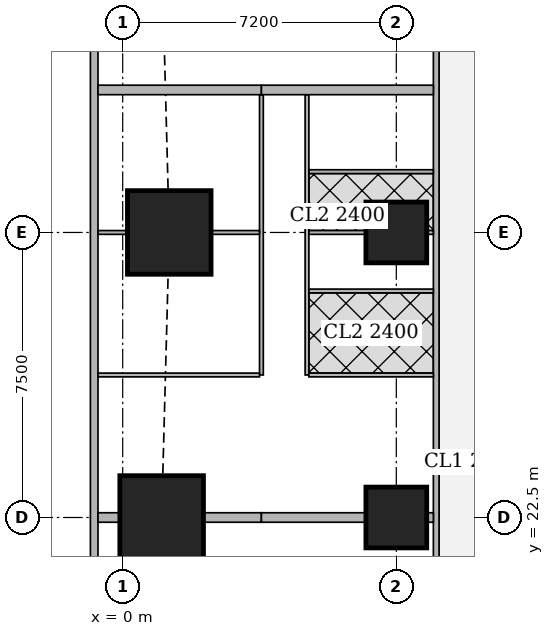
"""IFC4 building model, lengths in metres.
Left out: names, types, materials, properties, quantities, classifications, styles, units other than length and angle.
Written with IfcOpenShell. Run it as: python <this file> out.ifc"""

import sys

from ifc_helpers import new_model, si_unit, direction, frame, frame_2d, origin, origin_2d, place, context, subcontext, project, spatial, rectangle, extrude, element, fill, save


model = new_model("IFC4")
c1 = context("Model", 3, precision=1e-05, world=origin(), true_north=direction((0.0, 1.0)))
c2 = subcontext(c1, "Body", "Model", "MODEL_VIEW")
j1 = project(units=[si_unit("LENGTHUNIT", "METRE"), si_unit("PLANEANGLEUNIT", "RADIAN")], contexts=[c1])
p1 = place(None, origin())
s1 = spatial("IfcSite", under=j1, at=p1, CompositionType="ELEMENT")
p2 = place(p1, origin())
s2 = spatial("IfcBuilding", under=s1, at=p2, CompositionType="ELEMENT")
p3 = place(p2, frame((0.0, 0.0, 81.65)))
s3 = spatial("IfcBuildingStorey", under=s2, at=p3, CompositionType="ELEMENT", Elevation=81.65)
p4 = place(p3, frame((1.025, 22.5, 0.0), z_axis=(0.0, 0.0, 1.0), x_axis=(1.0, 0.0, 0.0)))
e1 = element("IfcColumn", 1, at=p4, inside=s3, PredefinedType="COLUMN", context=c2, shape_type="SweptSolid", body=[
    extrude(rectangle(XDim=2.2, YDim=2.2, at=origin_2d()), origin(), (0.0, 0.0, 1.0), 3.75),
])
p5 = place(p3, frame((7.2, 22.5, 0.0), z_axis=(0.0, 0.0, 1.0), x_axis=(1.0, 0.0, 0.0)))
e2 = element("IfcColumn", 2, at=p5, inside=s3, PredefinedType="COLUMN", context=c2, shape_type="SweptSolid", body=[
    extrude(rectangle(XDim=1.6, YDim=1.6, at=origin_2d()), origin(), (0.0, 0.0, 1.0), 3.75),
])
p6 = place(p3, frame((1.225, 30.0, 0.0), z_axis=(0.0, 0.0, 1.0), x_axis=(1.0, 0.0, 0.0)))
e3 = element("IfcColumn", 3, at=p6, inside=s3, PredefinedType="COLUMN", context=c2, shape_type="SweptSolid", body=[
    extrude(rectangle(XDim=2.2, YDim=2.2, at=origin_2d()), origin(), (0.0, 0.0, 1.0), 3.75),
])
p7 = place(p3, frame((7.2, 30.0, 0.0), z_axis=(0.0, 0.0, 1.0), x_axis=(1.0, 0.0, 0.0)))
e4 = element("IfcColumn", 4, at=p7, inside=s3, PredefinedType="COLUMN", context=c2, shape_type="SweptSolid", body=[
    extrude(rectangle(XDim=1.6, YDim=1.6, at=origin_2d()), origin(), (0.0, 0.0, 1.0), 3.75),
])
p8 = place(p3, frame((-0.75, 42.837, 0.0), z_axis=(0.0, 0.0, 1.0), x_axis=(0.0, -1.0, 0.0)))
e5 = element("IfcWall", 5, at=p8, inside=s3, PredefinedType="SOLIDWALL", context=c2, shape_type="SweptSolid", body=[
    extrude(rectangle(XDim=40.674, YDim=0.2, at=frame_2d((20.337, 0.0))), origin(), (0.0, 0.0, 1.0), 3.5),
])
p9 = place(p8, frame((1.78, 0.0, 0.9)))
e6 = element("IfcOpeningElement", 6, at=p9, cuts=e5, PredefinedType="OPENING", context=c2, shape_type="SweptSolid", body=[
    extrude(rectangle(XDim=1.8, YDim=1.5, at=frame_2d((0.9, 0.75))), frame((0.0, 0.11, 0.0), z_axis=(0.0, -1.0, 0.0), x_axis=(1.0, 0.0, 0.0)), (0.0, 0.0, 1.0), 0.22),
])
p10 = place(p8, frame((6.312, 0.0, 0.9)))
e7 = element("IfcOpeningElement", 7, at=p10, cuts=e5, PredefinedType="OPENING", context=c2, shape_type="SweptSolid", body=[
    extrude(rectangle(XDim=1.8, YDim=1.5, at=frame_2d((0.9, 0.75))), frame((0.0, 0.11, 0.0), z_axis=(0.0, -1.0, 0.0), x_axis=(1.0, 0.0, 0.0)), (0.0, 0.0, 1.0), 0.22),
])
p11 = place(p8, frame((10.062, 0.0, 0.9)))
e8 = element("IfcOpeningElement", 8, at=p11, cuts=e5, PredefinedType="OPENING", context=c2, shape_type="SweptSolid", body=[
    extrude(rectangle(XDim=1.8, YDim=1.5, at=frame_2d((0.9, 0.75))), frame((0.0, 0.11, 0.0), z_axis=(0.0, -1.0, 0.0), x_axis=(1.0, 0.0, 0.0)), (0.0, 0.0, 1.0), 0.22),
])
p12 = place(p8, frame((13.812, 0.0, 0.9)))
e9 = element("IfcOpeningElement", 9, at=p12, cuts=e5, PredefinedType="OPENING", context=c2, shape_type="SweptSolid", body=[
    extrude(rectangle(XDim=1.8, YDim=1.5, at=frame_2d((0.9, 0.75))), frame((0.0, 0.11, 0.0), z_axis=(0.0, -1.0, 0.0), x_axis=(1.0, 0.0, 0.0)), (0.0, 0.0, 1.0), 0.22),
])
p13 = place(p8, frame((17.562, 0.0, 0.9)))
e10 = element("IfcOpeningElement", 10, at=p13, cuts=e5, PredefinedType="OPENING", context=c2, shape_type="SweptSolid", body=[
    extrude(rectangle(XDim=1.8, YDim=1.5, at=frame_2d((0.9, 0.75))), frame((0.0, 0.11, 0.0), z_axis=(0.0, -1.0, 0.0), x_axis=(1.0, 0.0, 0.0)), (0.0, 0.0, 1.0), 0.22),
])
p14 = place(p8, frame((21.312, 0.0, 0.9)))
e11 = element("IfcOpeningElement", 11, at=p14, cuts=e5, PredefinedType="OPENING", context=c2, shape_type="SweptSolid", body=[
    extrude(rectangle(XDim=1.8, YDim=1.5, at=frame_2d((0.9, 0.75))), frame((0.0, 0.11, 0.0), z_axis=(0.0, -1.0, 0.0), x_axis=(1.0, 0.0, 0.0)), (0.0, 0.0, 1.0), 0.22),
])
p15 = place(p8, frame((25.062, 0.0, 0.9)))
e12 = element("IfcOpeningElement", 12, at=p15, cuts=e5, PredefinedType="OPENING", context=c2, shape_type="SweptSolid", body=[
    extrude(rectangle(XDim=1.8, YDim=1.5, at=frame_2d((0.9, 0.75))), frame((0.0, 0.11, 0.0), z_axis=(0.0, -1.0, 0.0), x_axis=(1.0, 0.0, 0.0)), (0.0, 0.0, 1.0), 0.22),
])
p16 = place(p8, frame((28.812, 0.0, 0.9)))
e13 = element("IfcOpeningElement", 13, at=p16, cuts=e5, PredefinedType="OPENING", context=c2, shape_type="SweptSolid", body=[
    extrude(rectangle(XDim=1.8, YDim=1.5, at=frame_2d((0.9, 0.75))), frame((0.0, 0.11, 0.0), z_axis=(0.0, -1.0, 0.0), x_axis=(1.0, 0.0, 0.0)), (0.0, 0.0, 1.0), 0.22),
])
p17 = place(p8, frame((32.562, 0.0, 0.9)))
e14 = element("IfcOpeningElement", 14, at=p17, cuts=e5, PredefinedType="OPENING", context=c2, shape_type="SweptSolid", body=[
    extrude(rectangle(XDim=1.8, YDim=1.5, at=frame_2d((0.9, 0.75))), frame((0.0, 0.11, 0.0), z_axis=(0.0, -1.0, 0.0), x_axis=(1.0, 0.0, 0.0)), (0.0, 0.0, 1.0), 0.22),
])
p18 = place(p8, frame((37.094, 0.0, 0.9)))
e15 = element("IfcOpeningElement", 15, at=p18, cuts=e5, PredefinedType="OPENING", context=c2, shape_type="SweptSolid", body=[
    extrude(rectangle(XDim=1.8, YDim=1.5, at=frame_2d((0.9, 0.75))), frame((0.0, 0.11, 0.0), z_axis=(0.0, -1.0, 0.0), x_axis=(1.0, 0.0, 0.0)), (0.0, 0.0, 1.0), 0.22),
])
p19 = place(p3, frame((8.25, 2.126, 0.0), z_axis=(0.0, 0.0, 1.0), x_axis=(0.0, 1.0, 0.0)))
e16 = element("IfcWall", 16, at=p19, inside=s3, PredefinedType="SOLIDWALL", context=c2, shape_type="SweptSolid", body=[
    extrude(rectangle(XDim=40.773, YDim=0.15, at=frame_2d((20.386, 0.0))), origin(), (0.0, 0.0, 1.0), 3.5),
])
p20 = place(p19, frame((17.787, 0.0, 0.0)))
e17 = element("IfcOpeningElement", 17, at=p20, cuts=e16, PredefinedType="OPENING", context=c2, shape_type="SweptSolid", body=[
    extrude(rectangle(XDim=1.0, YDim=2.1, at=frame_2d((0.5, 1.05))), frame((0.0, 0.085, 0.0), z_axis=(0.0, -1.0, 0.0), x_axis=(1.0, 0.0, 0.0)), (0.0, 0.0, 1.0), 0.17),
])
p21 = place(p19, frame((21.962, 0.0, 0.0)))
e18 = element("IfcOpeningElement", 18, at=p21, cuts=e16, PredefinedType="OPENING", context=c2, shape_type="SweptSolid", body=[
    extrude(rectangle(XDim=1.0, YDim=2.1, at=frame_2d((0.5, 1.05))), frame((0.0, 0.085, 0.0), z_axis=(0.0, -1.0, 0.0), x_axis=(1.0, 0.0, 0.0)), (0.0, 0.0, 1.0), 0.17),
])
p22 = place(p19, frame((32.787, 0.0, 0.0)))
e19 = element("IfcOpeningElement", 19, at=p22, cuts=e16, PredefinedType="OPENING", context=c2, shape_type="SweptSolid", body=[
    extrude(rectangle(XDim=1.0, YDim=2.1, at=frame_2d((0.5, 1.05))), frame((0.0, 0.085, 0.0), z_axis=(0.0, -1.0, 0.0), x_axis=(1.0, 0.0, 0.0)), (0.0, 0.0, 1.0), 0.17),
])
p23 = place(p3, frame((3.65, 26.25, 0.0), z_axis=(0.0, 0.0, 1.0), x_axis=(0.0, 1.0, 0.0)))
e20 = element("IfcWall", 20, at=p23, inside=s3, PredefinedType="PARTITIONING", context=c2, shape_type="SweptSolid", body=[
    extrude(rectangle(XDim=7.375, YDim=0.1, at=frame_2d((3.688, 0.0))), origin(), (0.0, 0.0, 1.0), 3.5),
])
p24 = place(p23, frame((0.2, 0.0, 0.0)))
e21 = element("IfcOpeningElement", 21, at=p24, cuts=e20, PredefinedType="OPENING", context=c2, shape_type="SweptSolid", body=[
    extrude(rectangle(XDim=0.9, YDim=2.1, at=frame_2d((0.45, 1.05))), frame((0.0, 0.06, 0.0), z_axis=(0.0, -1.0, 0.0), x_axis=(1.0, 0.0, 0.0)), (0.0, 0.0, 1.0), 0.12),
])
p25 = place(p23, frame((3.95, 0.0, 0.0)))
e22 = element("IfcOpeningElement", 22, at=p25, cuts=e20, PredefinedType="OPENING", context=c2, shape_type="SweptSolid", body=[
    extrude(rectangle(XDim=0.9, YDim=2.1, at=frame_2d((0.45, 1.05))), frame((0.0, 0.06, 0.0), z_axis=(0.0, -1.0, 0.0), x_axis=(1.0, 0.0, 0.0)), (0.0, 0.0, 1.0), 0.12),
])
p26 = place(p3, frame((4.85, 26.25, 0.0), z_axis=(0.0, 0.0, 1.0), x_axis=(0.0, 1.0, 0.0)))
e23 = element("IfcWall", 23, at=p26, inside=s3, PredefinedType="PARTITIONING", context=c2, shape_type="SweptSolid", body=[
    extrude(rectangle(XDim=7.375, YDim=0.1, at=frame_2d((3.688, 0.0))), origin(), (0.0, 0.0, 1.0), 3.5),
])
p27 = place(p26, frame((0.655, 0.0, 0.0)))
e24 = element("IfcOpeningElement", 24, at=p27, cuts=e23, PredefinedType="OPENING", context=c2, shape_type="SweptSolid", body=[
    extrude(rectangle(XDim=0.9, YDim=2.1, at=frame_2d((0.45, 1.05))), frame((0.0, 0.06, 0.0), z_axis=(0.0, -1.0, 0.0), x_axis=(1.0, 0.0, 0.0)), (0.0, 0.0, 1.0), 0.12),
])
p28 = place(p26, frame((4.1, 0.0, 0.0)))
e25 = element("IfcOpeningElement", 25, at=p28, cuts=e23, PredefinedType="OPENING", context=c2, shape_type="SweptSolid", body=[
    extrude(rectangle(XDim=0.9, YDim=2.1, at=frame_2d((0.45, 1.05))), frame((0.0, 0.06, 0.0), z_axis=(0.0, -1.0, 0.0), x_axis=(1.0, 0.0, 0.0)), (0.0, 0.0, 1.0), 0.12),
])
p29 = place(p26, frame((2.53, 0.0, 0.0)))
e26 = element("IfcOpeningElement", 26, at=p29, cuts=e23, PredefinedType="OPENING", context=c2, shape_type="SweptSolid", body=[
    extrude(rectangle(XDim=0.9, YDim=2.1, at=frame_2d((0.45, 1.05))), frame((0.0, 0.06, 0.0), z_axis=(0.0, -1.0, 0.0), x_axis=(1.0, 0.0, 0.0)), (0.0, 0.0, 1.0), 0.12),
])
p30 = place(p26, frame((5.975, 0.0, 0.0)))
e27 = element("IfcOpeningElement", 27, at=p30, cuts=e23, PredefinedType="OPENING", context=c2, shape_type="SweptSolid", body=[
    extrude(rectangle(XDim=0.9, YDim=2.1, at=frame_2d((0.45, 1.05))), frame((0.0, 0.06, 0.0), z_axis=(0.0, -1.0, 0.0), x_axis=(1.0, 0.0, 0.0)), (0.0, 0.0, 1.0), 0.12),
])
p31 = place(p3, frame((-0.65, 26.25, 0.0), z_axis=(0.0, 0.0, 1.0), x_axis=(1.0, 0.0, 0.0)))
e28 = element("IfcWall", 28, at=p31, inside=s3, PredefinedType="PARTITIONING", context=c2, shape_type="SweptSolid", body=[
    extrude(rectangle(XDim=4.25, YDim=0.1, at=frame_2d((2.125, 0.0))), origin(), (0.0, 0.0, 1.0), 2.2),
])
p32 = place(p3, frame((-0.65, 30.0, 0.0), z_axis=(0.0, 0.0, 1.0), x_axis=(1.0, 0.0, 0.0)))
e29 = element("IfcWall", 29, at=p32, inside=s3, PredefinedType="PARTITIONING", context=c2, shape_type="SweptSolid", body=[
    extrude(rectangle(XDim=0.774, YDim=0.1, at=frame_2d((0.387, 0.0))), origin(), (0.0, 0.0, 1.0), 3.5),
])
p33 = place(p3, frame((2.326, 30.0, 0.0), z_axis=(0.0, 0.0, 1.0), x_axis=(1.0, 0.0, 0.0)))
e30 = element("IfcWall", 30, at=p33, inside=s3, PredefinedType="PARTITIONING", context=c2, shape_type="SweptSolid", body=[
    extrude(rectangle(XDim=1.274, YDim=0.1, at=frame_2d((0.637, 0.0))), origin(), (0.0, 0.0, 1.0), 3.5),
])
p34 = place(p3, frame((4.9, 26.25, 0.0), z_axis=(0.0, 0.0, 1.0), x_axis=(1.0, 0.0, 0.0)))
e31 = element("IfcWall", 31, at=p34, inside=s3, PredefinedType="PARTITIONING", context=c2, shape_type="SweptSolid", body=[
    extrude(rectangle(XDim=3.275, YDim=0.1, at=frame_2d((1.638, 0.0))), origin(), (0.0, 0.0, 1.0), 3.5),
])
p35 = place(p3, frame((4.9, 30.0, 0.0), z_axis=(0.0, 0.0, 1.0), x_axis=(1.0, 0.0, 0.0)))
e32 = element("IfcWall", 32, at=p35, inside=s3, PredefinedType="PARTITIONING", context=c2, shape_type="SweptSolid", body=[
    extrude(rectangle(XDim=1.499, YDim=0.1, at=frame_2d((0.75, 0.0))), origin(), (0.0, 0.0, 1.0), 3.5),
])
p36 = place(p3, frame((8.001, 30.0, 0.0), z_axis=(0.0, 0.0, 1.0), x_axis=(1.0, 0.0, 0.0)))
e33 = element("IfcWall", 33, at=p36, inside=s3, PredefinedType="PARTITIONING", context=c2, shape_type="SweptSolid", body=[
    extrude(rectangle(XDim=0.174, YDim=0.1, at=frame_2d((0.087, 0.0))), origin(), (0.0, 0.0, 1.0), 3.5),
])
for number, where, z_axis, x_axis in (
    (34, (4.9, 28.46, 0.0), (0.0, 0.0, 1.0), (1.0, 0.0, 0.0)),
    (35, (4.9, 31.6, 0.0), (0.0, 0.0, 1.0), (1.0, 0.0, 0.0)),
):
    element("IfcWall", number, at=place(p3, frame(where, z_axis=z_axis, x_axis=x_axis)), inside=s3, PredefinedType="PARTITIONING", context=c2, shape_type="SweptSolid", body=[
        extrude(rectangle(XDim=3.275, YDim=0.1, at=frame_2d((1.638, 0.0))), origin(), (0.0, 0.0, 1.0), 3.5),
    ])
p37 = place(p3, frame((-0.65, 22.5, 0.0), z_axis=(0.0, 0.0, 1.0), x_axis=(1.0, 0.0, 0.0)))
e36 = element("IfcWall", 36, at=p37, inside=s3, PredefinedType="SOLIDWALL", context=c2, shape_type="SweptSolid", body=[
    extrude(rectangle(XDim=0.574, YDim=0.25, at=frame_2d((0.287, 0.0))), origin(), (0.0, 0.0, 1.0), 3.5),
])
p38 = place(p3, frame((2.126, 22.5, 0.0), z_axis=(0.0, 0.0, 1.0), x_axis=(1.0, 0.0, 0.0)))
e37 = element("IfcWall", 37, at=p38, inside=s3, PredefinedType="SOLIDWALL", context=c2, shape_type="SweptSolid", body=[
    extrude(rectangle(XDim=1.524, YDim=0.25, at=frame_2d((0.762, 0.0))), origin(), (0.0, 0.0, 1.0), 3.5),
])
p39 = place(p3, frame((3.65, 22.5, 0.0), z_axis=(0.0, 0.0, 1.0), x_axis=(1.0, 0.0, 0.0)))
e38 = element("IfcWall", 38, at=p39, inside=s3, PredefinedType="SOLIDWALL", context=c2, shape_type="SweptSolid", body=[
    extrude(rectangle(XDim=2.749, YDim=0.25, at=frame_2d((1.375, 0.0))), origin(), (0.0, 0.0, 1.0), 3.5),
])
p40 = place(p3, frame((8.001, 22.5, 0.0), z_axis=(0.0, 0.0, 1.0), x_axis=(1.0, 0.0, 0.0)))
e39 = element("IfcWall", 39, at=p40, inside=s3, PredefinedType="SOLIDWALL", context=c2, shape_type="SweptSolid", body=[
    extrude(rectangle(XDim=0.174, YDim=0.25, at=frame_2d((0.087, 0.0))), origin(), (0.0, 0.0, 1.0), 3.5),
])
p41 = place(p3, frame((-0.65, 33.75, 0.0), z_axis=(0.0, 0.0, 1.0), x_axis=(1.0, 0.0, 0.0)))
e40 = element("IfcWall", 40, at=p41, inside=s3, PredefinedType="SOLIDWALL", context=c2, shape_type="SweptSolid", body=[
    extrude(rectangle(XDim=4.3, YDim=0.25, at=frame_2d((2.15, 0.0))), origin(), (0.0, 0.0, 1.0), 2.2),
])
p42 = place(p3, frame((3.65, 33.75, 0.0), z_axis=(0.0, 0.0, 1.0), x_axis=(1.0, 0.0, 0.0)))
e41 = element("IfcWall", 41, at=p42, inside=s3, PredefinedType="SOLIDWALL", context=c2, shape_type="SweptSolid", body=[
    extrude(rectangle(XDim=4.525, YDim=0.25, at=frame_2d((2.263, 0.0))), origin(), (0.0, 0.0, 1.0), 3.5),
])
p43 = place(p10, origin())
e42 = element("IfcWindow", 42, at=p43, inside=s3, PartitioningType="SINGLE_PANEL", PredefinedType="WINDOW", context=c2, shape_type="SweptSolid", body=[
    extrude(rectangle(XDim=1.8, YDim=1.5, at=frame_2d((0.9, 0.75))), frame((0.0, 0.03, 0.0), z_axis=(0.0, -1.0, 0.0), x_axis=(1.0, 0.0, 0.0)), (0.0, 0.0, 1.0), 0.06),
])
fill(e7, e42)
p44 = place(p11, origin())
e43 = element("IfcWindow", 43, at=p44, inside=s3, PartitioningType="SINGLE_PANEL", PredefinedType="WINDOW", context=c2, shape_type="SweptSolid", body=[
    extrude(rectangle(XDim=1.8, YDim=1.5, at=frame_2d((0.9, 0.75))), frame((0.0, 0.03, 0.0), z_axis=(0.0, -1.0, 0.0), x_axis=(1.0, 0.0, 0.0)), (0.0, 0.0, 1.0), 0.06),
])
fill(e8, e43)
p45 = place(p12, origin())
e44 = element("IfcWindow", 44, at=p45, inside=s3, PartitioningType="SINGLE_PANEL", PredefinedType="WINDOW", context=c2, shape_type="SweptSolid", body=[
    extrude(rectangle(XDim=1.8, YDim=1.5, at=frame_2d((0.9, 0.75))), frame((0.0, 0.03, 0.0), z_axis=(0.0, -1.0, 0.0), x_axis=(1.0, 0.0, 0.0)), (0.0, 0.0, 1.0), 0.06),
])
fill(e9, e44)
p46 = place(p13, origin())
e45 = element("IfcWindow", 45, at=p46, inside=s3, PartitioningType="SINGLE_PANEL", PredefinedType="WINDOW", context=c2, shape_type="SweptSolid", body=[
    extrude(rectangle(XDim=1.8, YDim=1.5, at=frame_2d((0.9, 0.75))), frame((0.0, 0.03, 0.0), z_axis=(0.0, -1.0, 0.0), x_axis=(1.0, 0.0, 0.0)), (0.0, 0.0, 1.0), 0.06),
])
fill(e10, e45)
p47 = place(p14, origin())
e46 = element("IfcWindow", 46, at=p47, inside=s3, PartitioningType="SINGLE_PANEL", PredefinedType="WINDOW", context=c2, shape_type="SweptSolid", body=[
    extrude(rectangle(XDim=1.8, YDim=1.5, at=frame_2d((0.9, 0.75))), frame((0.0, 0.03, 0.0), z_axis=(0.0, -1.0, 0.0), x_axis=(1.0, 0.0, 0.0)), (0.0, 0.0, 1.0), 0.06),
])
fill(e11, e46)
p48 = place(p24, origin())
e47 = element("IfcDoor", 47, at=p48, inside=s3, OperationType="SINGLE_SWING_LEFT", PredefinedType="DOOR", context=c2, shape_type="SweptSolid", body=[
    extrude(rectangle(XDim=0.9, YDim=2.1, at=frame_2d((0.45, 1.05))), frame((0.0, 0.025, 0.0), z_axis=(0.0, -1.0, 0.0), x_axis=(1.0, 0.0, 0.0)), (0.0, 0.0, 1.0), 0.05),
])
fill(e21, e47)
p49 = place(p25, origin())
e48 = element("IfcDoor", 48, at=p49, inside=s3, OperationType="SINGLE_SWING_LEFT", PredefinedType="DOOR", context=c2, shape_type="SweptSolid", body=[
    extrude(rectangle(XDim=0.9, YDim=2.1, at=frame_2d((0.45, 1.05))), frame((0.0, 0.025, 0.0), z_axis=(0.0, -1.0, 0.0), x_axis=(1.0, 0.0, 0.0)), (0.0, 0.0, 1.0), 0.05),
])
fill(e22, e48)
p50 = place(p27, origin())
e49 = element("IfcDoor", 49, at=p50, inside=s3, OperationType="SINGLE_SWING_RIGHT", PredefinedType="DOOR", context=c2, shape_type="SweptSolid", body=[
    extrude(rectangle(XDim=0.9, YDim=2.1, at=frame_2d((0.45, 1.05))), frame((0.0, 0.025, 0.0), z_axis=(0.0, -1.0, 0.0), x_axis=(1.0, 0.0, 0.0)), (0.0, 0.0, 1.0), 0.05),
])
fill(e24, e49)
p51 = place(p28, origin())
e50 = element("IfcDoor", 50, at=p51, inside=s3, OperationType="SINGLE_SWING_RIGHT", PredefinedType="DOOR", context=c2, shape_type="SweptSolid", body=[
    extrude(rectangle(XDim=0.9, YDim=2.1, at=frame_2d((0.45, 1.05))), frame((0.0, 0.025, 0.0), z_axis=(0.0, -1.0, 0.0), x_axis=(1.0, 0.0, 0.0)), (0.0, 0.0, 1.0), 0.05),
])
fill(e25, e50)
p52 = place(p29, origin())
e51 = element("IfcDoor", 51, at=p52, inside=s3, OperationType="SINGLE_SWING_RIGHT", PredefinedType="DOOR", context=c2, shape_type="SweptSolid", body=[
    extrude(rectangle(XDim=0.9, YDim=2.1, at=frame_2d((0.45, 1.05))), frame((0.0, 0.025, 0.0), z_axis=(0.0, -1.0, 0.0), x_axis=(1.0, 0.0, 0.0)), (0.0, 0.0, 1.0), 0.05),
])
fill(e26, e51)
p53 = place(p30, origin())
e52 = element("IfcDoor", 52, at=p53, inside=s3, OperationType="SINGLE_SWING_LEFT", PredefinedType="DOOR", context=c2, shape_type="SweptSolid", body=[
    extrude(rectangle(XDim=0.9, YDim=2.1, at=frame_2d((0.45, 1.05))), frame((0.0, 0.025, 0.0), z_axis=(0.0, -1.0, 0.0), x_axis=(1.0, 0.0, 0.0)), (0.0, 0.0, 1.0), 0.05),
])
fill(e27, e52)
p54 = place(p21, origin())
e53 = element("IfcDoor", 53, at=p54, inside=s3, OperationType="SINGLE_SWING_RIGHT", PredefinedType="DOOR", context=c2, shape_type="SweptSolid", body=[
    extrude(rectangle(XDim=1.0, YDim=2.1, at=frame_2d((0.5, 1.05))), frame((0.0, 0.025, 0.0), z_axis=(0.0, -1.0, 0.0), x_axis=(1.0, 0.0, 0.0)), (0.0, 0.0, 1.0), 0.05),
])
fill(e18, e53)
save(model, sys.argv[1])
